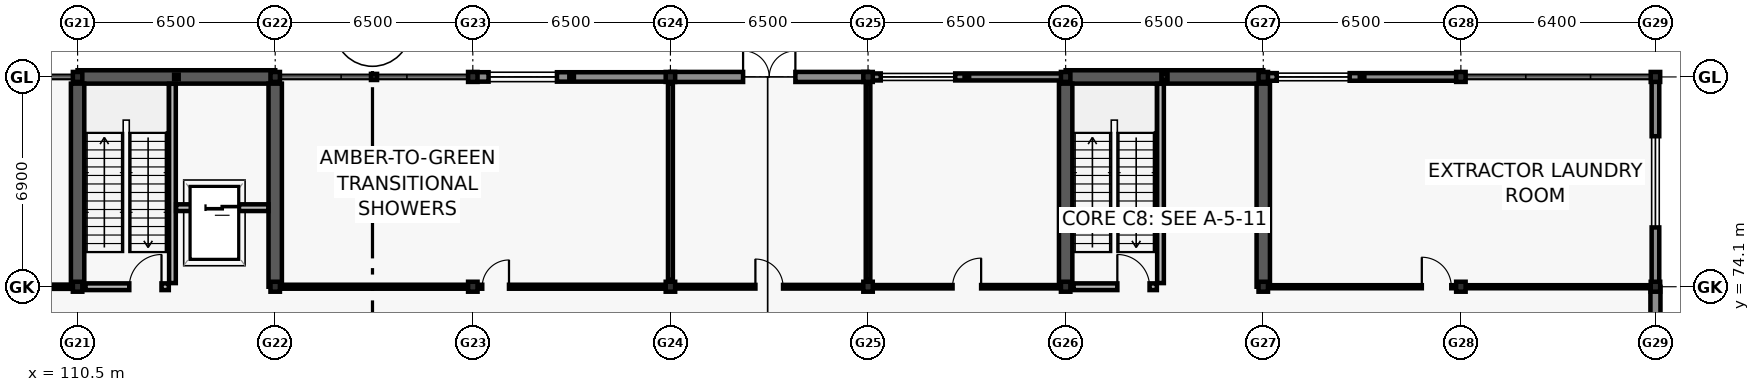
"""IFC4 building model, lengths in metres.
Left out: names, types, materials, properties, quantities, classifications, styles, units other than length and angle.
Written with IfcOpenShell. Run it as: python <this file> out.ifc"""

import sys

from ifc_helpers import new_model, si_unit, direction, frame, frame_2d, origin, origin_2d, place, context, subcontext, project, spatial, rectangle, hollow_rectangle, i_section, extrude, element, fill, save


model = new_model("IFC4")
c1 = context("Model", 3, precision=1e-05, world=origin(), true_north=direction((0.0, 1.0)))
c2 = subcontext(c1, "Body", "Model", "MODEL_VIEW")
j1 = project(units=[si_unit("LENGTHUNIT", "METRE"), si_unit("PLANEANGLEUNIT", "RADIAN")], contexts=[c1])
p1 = place(None, origin())
s1 = spatial("IfcSite", under=j1, at=p1, CompositionType="ELEMENT")
p2 = place(p1, origin())
s2 = spatial("IfcBuilding", under=s1, at=p2, CompositionType="ELEMENT")
p3 = place(p2, origin())
s3 = spatial("IfcBuildingStorey", under=s2, at=p3, CompositionType="ELEMENT", Elevation=0.0)
for number, where, z_axis, x_axis in (
    (1, (110.5, 74.1, 0.0), (0.0, 0.0, 1.0), (1.0, 0.0, 0.0)),
    (2, (110.5, 81.0, 0.0), (0.0, 0.0, 1.0), (1.0, 0.0, 0.0)),
    (3, (117.0, 74.1, 0.0), (0.0, 0.0, 1.0), (1.0, 0.0, 0.0)),
    (4, (117.0, 81.0, 0.0), (0.0, 0.0, 1.0), (1.0, 0.0, 0.0)),
    (5, (123.5, 74.1, 0.0), (0.0, 0.0, 1.0), (1.0, 0.0, 0.0)),
    (6, (123.5, 81.0, 0.0), (0.0, 0.0, 1.0), (1.0, 0.0, 0.0)),
    (7, (130.0, 74.1, 0.0), (0.0, 0.0, 1.0), (1.0, 0.0, 0.0)),
    (8, (130.0, 81.0, 0.0), (0.0, 0.0, 1.0), (1.0, 0.0, 0.0)),
    (9, (136.5, 74.1, 0.0), (0.0, 0.0, 1.0), (1.0, 0.0, 0.0)),
    (10, (136.5, 81.0, 0.0), (0.0, 0.0, 1.0), (1.0, 0.0, 0.0)),
    (11, (143.0, 74.1, 0.0), (0.0, 0.0, 1.0), (1.0, 0.0, 0.0)),
    (12, (143.0, 81.0, 0.0), (0.0, 0.0, 1.0), (1.0, 0.0, 0.0)),
    (13, (149.5, 74.1, 0.0), (0.0, 0.0, 1.0), (1.0, 0.0, 0.0)),
    (14, (149.5, 81.0, 0.0), (0.0, 0.0, 1.0), (1.0, 0.0, 0.0)),
    (15, (156.0, 74.1, 0.0), (0.0, 0.0, 1.0), (1.0, 0.0, 0.0)),
    (16, (156.0, 81.0, 0.0), (0.0, 0.0, 1.0), (1.0, 0.0, 0.0)),
    (17, (162.4, 74.1, 0.0), (0.0, 0.0, 1.0), (1.0, 0.0, 0.0)),
    (18, (162.4, 81.0, 0.0), (0.0, 0.0, 1.0), (1.0, 0.0, 0.0)),
):
    element("IfcColumn", number, at=place(p3, frame(where, z_axis=z_axis, x_axis=x_axis)), inside=s3, PredefinedType="COLUMN", context=c2, shape_type="SweptSolid", body=[
        extrude(i_section(OverallWidth=0.311, OverallDepth=0.327, WebThickness=0.016, FlangeThickness=0.025, FilletRadius=0.017, at=origin_2d()), origin(), (0.0, 0.0, 1.0), 5.4),
    ])
p4 = place(p3, frame((113.75, 81.0, 0.0), z_axis=(0.0, 0.0, 1.0), x_axis=(1.0, 0.0, 0.0)))
e19 = element("IfcColumn", 19, at=p4, inside=s3, PredefinedType="PILASTER", context=c2, shape_type="SweptSolid", body=[
    extrude(hollow_rectangle(XDim=0.15, YDim=0.15, WallThickness=0.009, at=origin_2d()), origin(), (0.0, 0.0, 1.0), 5.4),
])
p5 = place(p3, frame((120.25, 81.0, 0.0), z_axis=(0.0, 0.0, 1.0), x_axis=(1.0, 0.0, 0.0)))
e20 = element("IfcColumn", 20, at=p5, inside=s3, PredefinedType="PILASTER", context=c2, shape_type="SweptSolid", body=[
    extrude(hollow_rectangle(XDim=0.2, YDim=0.2, WallThickness=0.01, at=origin_2d()), origin(), (0.0, 0.0, 1.0), 5.4),
])
for number, where, z_axis, x_axis in (
    (21, (126.75, 81.0, 0.0), (0.0, 0.0, 1.0), (1.0, 0.0, 0.0)),
    (22, (139.75, 81.0, 0.0), (0.0, 0.0, 1.0), (1.0, 0.0, 0.0)),
):
    element("IfcColumn", number, at=place(p3, frame(where, z_axis=z_axis, x_axis=x_axis)), inside=s3, PredefinedType="PILASTER", context=c2, shape_type="SweptSolid", body=[
        extrude(hollow_rectangle(XDim=0.15, YDim=0.15, WallThickness=0.009, at=origin_2d()), origin(), (0.0, 0.0, 1.0), 5.4),
    ])
p6 = place(p3, frame((146.25, 81.0, 0.0), z_axis=(0.0, 0.0, 1.0), x_axis=(1.0, 0.0, 0.0)))
e23 = element("IfcColumn", 23, at=p6, inside=s3, PredefinedType="PILASTER", context=c2, shape_type="SweptSolid", body=[
    extrude(hollow_rectangle(XDim=0.2, YDim=0.2, WallThickness=0.01, at=origin_2d()), origin(), (0.0, 0.0, 1.0), 5.4),
])
p7 = place(p3, frame((152.75, 81.0, 0.0), z_axis=(0.0, 0.0, 1.0), x_axis=(1.0, 0.0, 0.0)))
e24 = element("IfcColumn", 24, at=p7, inside=s3, PredefinedType="PILASTER", context=c2, shape_type="SweptSolid", body=[
    extrude(hollow_rectangle(XDim=0.15, YDim=0.15, WallThickness=0.009, at=origin_2d()), origin(), (0.0, 0.0, 1.0), 5.4),
])
p8 = place(p3, frame((110.5, 81.0, 0.0), z_axis=(0.0, 0.0, 1.0), x_axis=(1.0, 0.0, 0.0)))
e25 = element("IfcWall", 25, at=p8, inside=s3, PredefinedType="SHEAR", context=c2, shape_type="SweptSolid", body=[
    extrude(rectangle(XDim=6.5, YDim=0.44, at=frame_2d((3.25, 0.0))), origin(), (0.0, 0.0, 1.0), 5.16),
])
for number, where, z_axis, x_axis in (
    (26, (110.5, 74.1, 0.0), (0.0, 0.0, 1.0), (0.0, 1.0, 0.0)),
    (27, (117.0, 74.1, 0.0), (0.0, 0.0, 1.0), (0.0, 1.0, 0.0)),
):
    element("IfcWall", number, at=place(p3, frame(where, z_axis=z_axis, x_axis=x_axis)), inside=s3, PredefinedType="SHEAR", context=c2, shape_type="SweptSolid", body=[
        extrude(rectangle(XDim=6.68, YDim=0.44, at=frame_2d((3.34, 0.0))), origin(), (0.0, 0.0, 1.0), 5.16),
    ])
p9 = place(p3, frame((143.0, 81.0, 0.0), z_axis=(0.0, 0.0, 1.0), x_axis=(1.0, 0.0, 0.0)))
e28 = element("IfcWall", 28, at=p9, inside=s3, PredefinedType="SHEAR", context=c2, shape_type="SweptSolid", body=[
    extrude(rectangle(XDim=6.5, YDim=0.44, at=frame_2d((3.25, 0.0))), origin(), (0.0, 0.0, 1.0), 5.16),
])
for number, where, z_axis, x_axis in (
    (29, (143.0, 74.1, 0.0), (0.0, 0.0, 1.0), (0.0, 1.0, 0.0)),
    (30, (149.5, 74.1, 0.0), (0.0, 0.0, 1.0), (0.0, 1.0, 0.0)),
):
    element("IfcWall", number, at=place(p3, frame(where, z_axis=z_axis, x_axis=x_axis)), inside=s3, PredefinedType="SHEAR", context=c2, shape_type="SweptSolid", body=[
        extrude(rectangle(XDim=6.68, YDim=0.44, at=frame_2d((3.34, 0.0))), origin(), (0.0, 0.0, 1.0), 5.16),
    ])
p10 = place(p3, frame((123.505, 81.0, 0.0), z_axis=(0.0, 0.0, 1.0), x_axis=(1.0, 0.0, 0.0)))
e31 = element("IfcWall", 31, at=p10, inside=s3, PredefinedType="SOLIDWALL", context=c2, shape_type="SweptSolid", body=[
    extrude(rectangle(XDim=6.49, YDim=0.31, at=frame_2d((3.245, 0.0))), origin(), (0.0, 0.0, 1.0), 4.52),
])
p11 = place(p10, frame((0.512, 0.0, 0.8)))
e32 = element("IfcOpeningElement", 32, at=p11, cuts=e31, PredefinedType="OPENING", context=c2, shape_type="SweptSolid", body=[
    extrude(rectangle(XDim=2.25, YDim=1.95, at=frame_2d((1.125, 0.975))), frame((0.0, 0.165, 0.0), z_axis=(0.0, -1.0, 0.0), x_axis=(1.0, 0.0, 0.0)), (0.0, 0.0, 1.0), 0.33),
])
p12 = place(p3, frame((130.005, 81.0, 0.0), z_axis=(0.0, 0.0, 1.0), x_axis=(1.0, 0.0, 0.0)))
e33 = element("IfcWall", 33, at=p12, inside=s3, PredefinedType="SOLIDWALL", context=c2, shape_type="SweptSolid", body=[
    extrude(rectangle(XDim=6.49, YDim=0.33, at=frame_2d((3.245, 0.0))), origin(), (0.0, 0.0, 1.0), 4.52),
])
p13 = place(p12, frame((2.385, 0.0, 0.0)))
e34 = element("IfcOpeningElement", 34, at=p13, cuts=e33, PredefinedType="OPENING", context=c2, shape_type="SweptSolid", body=[
    extrude(rectangle(XDim=1.72, YDim=2.2, at=frame_2d((0.86, 1.1))), frame((0.0, 0.175, 0.0), z_axis=(0.0, -1.0, 0.0), x_axis=(1.0, 0.0, 0.0)), (0.0, 0.0, 1.0), 0.35),
])
p14 = place(p3, frame((136.505, 81.0, 0.0), z_axis=(0.0, 0.0, 1.0), x_axis=(1.0, 0.0, 0.0)))
e35 = element("IfcWall", 35, at=p14, inside=s3, PredefinedType="SOLIDWALL", context=c2, shape_type="SweptSolid", body=[
    extrude(rectangle(XDim=6.49, YDim=0.23, at=frame_2d((3.245, 0.0))), origin(), (0.0, 0.0, 1.0), 4.52),
])
p15 = place(p14, frame((0.413, 0.0, 0.8)))
e36 = element("IfcOpeningElement", 36, at=p15, cuts=e35, PredefinedType="OPENING", context=c2, shape_type="SweptSolid", body=[
    extrude(rectangle(XDim=2.45, YDim=1.95, at=frame_2d((1.225, 0.975))), frame((0.0, 0.125, 0.0), z_axis=(0.0, -1.0, 0.0), x_axis=(1.0, 0.0, 0.0)), (0.0, 0.0, 1.0), 0.25),
])
p16 = place(p3, frame((149.505, 81.0, 0.0), z_axis=(0.0, 0.0, 1.0), x_axis=(1.0, 0.0, 0.0)))
e37 = element("IfcWall", 37, at=p16, inside=s3, PredefinedType="SOLIDWALL", context=c2, shape_type="SweptSolid", body=[
    extrude(rectangle(XDim=6.49, YDim=0.25, at=frame_2d((3.245, 0.0))), origin(), (0.0, 0.0, 1.0), 4.52),
])
p17 = place(p16, frame((0.438, 0.0, 0.8)))
e38 = element("IfcOpeningElement", 38, at=p17, cuts=e37, PredefinedType="OPENING", context=c2, shape_type="SweptSolid", body=[
    extrude(rectangle(XDim=2.4, YDim=2.1, at=frame_2d((1.2, 1.05))), frame((0.0, 0.135, 0.0), z_axis=(0.0, -1.0, 0.0), x_axis=(1.0, 0.0, 0.0)), (0.0, 0.0, 1.0), 0.27),
])
p18 = place(p3, frame((162.4, 74.095, 0.0), z_axis=(0.0, 0.0, 1.0), x_axis=(0.0, -1.0, 0.0)))
e39 = element("IfcWall", 39, at=p18, inside=s3, PredefinedType="SOLIDWALL", context=c2, shape_type="SweptSolid", body=[
    extrude(rectangle(XDim=6.89, YDim=0.33, at=frame_2d((3.445, 0.0))), origin(), (0.0, 0.0, 1.0), 4.52),
])
p19 = place(p18, frame((3.377, 0.0, 0.8)))
e40 = element("IfcOpeningElement", 40, at=p19, cuts=e39, PredefinedType="OPENING", context=c2, shape_type="SweptSolid", body=[
    extrude(rectangle(XDim=2.7, YDim=2.1, at=frame_2d((1.35, 1.05))), frame((0.0, 0.175, 0.0), z_axis=(0.0, -1.0, 0.0), x_axis=(1.0, 0.0, 0.0)), (0.0, 0.0, 1.0), 0.35),
])
p20 = place(p3, frame((162.4, 80.995, 0.0), z_axis=(0.0, 0.0, 1.0), x_axis=(0.0, -1.0, 0.0)))
e41 = element("IfcWall", 41, at=p20, inside=s3, PredefinedType="SOLIDWALL", context=c2, shape_type="SweptSolid", body=[
    extrude(rectangle(XDim=6.89, YDim=0.25, at=frame_2d((3.445, 0.0))), origin(), (0.0, 0.0, 1.0), 4.52),
])
p21 = place(p20, frame((1.945, 0.0, 0.8)))
e42 = element("IfcOpeningElement", 42, at=p21, cuts=e41, PredefinedType="OPENING", context=c2, shape_type="SweptSolid", body=[
    extrude(rectangle(XDim=3.0, YDim=2.1, at=frame_2d((1.5, 1.05))), frame((0.0, 0.135, 0.0), z_axis=(0.0, -1.0, 0.0), x_axis=(1.0, 0.0, 0.0)), (0.0, 0.0, 1.0), 0.27),
])
p22 = place(p3, frame((113.62, 74.22, 0.0), z_axis=(0.0, 0.0, 1.0), x_axis=(0.0, 1.0, 0.0)))
e43 = element("IfcWall", 43, at=p22, inside=s3, PredefinedType="SOLIDWALL", context=c2, shape_type="SweptSolid", body=[
    extrude(rectangle(XDim=6.555, YDim=0.22, at=frame_2d((3.277, 0.0))), origin(), (0.0, 0.0, 1.0), 5.16),
])
p23 = place(p3, frame((110.76, 74.1, 0.0), z_axis=(0.0, 0.0, 1.0), x_axis=(1.0, 0.0, 0.0)))
e44 = element("IfcWall", 44, at=p23, inside=s3, PredefinedType="SOLIDWALL", context=c2, shape_type="SweptSolid", body=[
    extrude(rectangle(XDim=2.74, YDim=0.22, at=frame_2d((1.37, 0.0))), origin(), (0.0, 0.0, 1.0), 4.52),
])
p24 = place(p23, frame((1.44, 0.0, 0.0)))
e45 = element("IfcOpeningElement", 45, at=p24, cuts=e44, PredefinedType="OPENING", context=c2, shape_type="SweptSolid", body=[
    extrude(rectangle(XDim=1.06, YDim=2.1, at=frame_2d((0.53, 1.05))), frame((0.0, 0.12, 0.0), z_axis=(0.0, -1.0, 0.0), x_axis=(1.0, 0.0, 0.0)), (0.0, 0.0, 1.0), 0.24),
])
p25 = place(p3, frame((113.74, 76.7, 0.0), z_axis=(0.0, 0.0, 1.0), x_axis=(1.0, 0.0, 0.0)))
e46 = element("IfcWall", 46, at=p25, inside=s3, PredefinedType="SOLIDWALL", context=c2, shape_type="SweptSolid", body=[
    extrude(rectangle(XDim=3.035, YDim=0.22, at=frame_2d((1.518, 0.0))), origin(), (0.0, 0.0, 1.0), 5.16),
])
p26 = place(p25, frame((0.968, 0.0, 0.0)))
e47 = element("IfcOpeningElement", 47, at=p26, cuts=e46, PredefinedType="OPENING", context=c2, shape_type="SweptSolid", body=[
    extrude(rectangle(XDim=1.1, YDim=2.1, at=frame_2d((0.55, 1.05))), frame((0.0, 0.12, 0.0), z_axis=(0.0, -1.0, 0.0), x_axis=(1.0, 0.0, 0.0)), (0.0, 0.0, 1.0), 0.24),
])
p27 = place(p3, frame((146.12, 74.22, 0.0), z_axis=(0.0, 0.0, 1.0), x_axis=(0.0, 1.0, 0.0)))
e48 = element("IfcWall", 48, at=p27, inside=s3, PredefinedType="SOLIDWALL", context=c2, shape_type="SweptSolid", body=[
    extrude(rectangle(XDim=6.555, YDim=0.22, at=frame_2d((3.277, 0.0))), origin(), (0.0, 0.0, 1.0), 5.16),
])
p28 = place(p3, frame((143.26, 74.1, 0.0), z_axis=(0.0, 0.0, 1.0), x_axis=(1.0, 0.0, 0.0)))
e49 = element("IfcWall", 49, at=p28, inside=s3, PredefinedType="SOLIDWALL", context=c2, shape_type="SweptSolid", body=[
    extrude(rectangle(XDim=2.74, YDim=0.22, at=frame_2d((1.37, 0.0))), origin(), (0.0, 0.0, 1.0), 4.52),
])
p29 = place(p28, frame((1.44, 0.0, 0.0)))
e50 = element("IfcOpeningElement", 50, at=p29, cuts=e49, PredefinedType="OPENING", context=c2, shape_type="SweptSolid", body=[
    extrude(rectangle(XDim=1.06, YDim=2.1, at=frame_2d((0.53, 1.05))), frame((0.0, 0.12, 0.0), z_axis=(0.0, -1.0, 0.0), x_axis=(1.0, 0.0, 0.0)), (0.0, 0.0, 1.0), 0.24),
])
p30 = place(p3, frame((104.22, 74.1, 0.0), z_axis=(0.0, 0.0, 1.0), x_axis=(1.0, 0.0, 0.0)))
e51 = element("IfcWall", 51, at=p30, inside=s3, PredefinedType="PARTITIONING", context=c2, shape_type="SweptSolid", body=[
    extrude(rectangle(XDim=6.06, YDim=0.14, at=frame_2d((3.03, 0.0))), origin(), (0.0, 0.0, 1.0), 4.5),
])
p31 = place(p30, frame((2.11, 0.0, 0.0)))
e52 = element("IfcOpeningElement", 52, at=p31, cuts=e51, PredefinedType="OPENING", context=c2, shape_type="SweptSolid", body=[
    extrude(rectangle(XDim=1.84, YDim=2.22, at=frame_2d((0.92, 1.11))), frame((0.0, 0.08, 0.0), z_axis=(0.0, -1.0, 0.0), x_axis=(1.0, 0.0, 0.0)), (0.0, 0.0, 1.0), 0.16),
])
p32 = place(p3, frame((117.22, 74.1, 0.0), z_axis=(0.0, 0.0, 1.0), x_axis=(1.0, 0.0, 0.0)))
e53 = element("IfcWall", 53, at=p32, inside=s3, PredefinedType="PARTITIONING", context=c2, shape_type="SweptSolid", body=[
    extrude(rectangle(XDim=12.56, YDim=0.13, at=frame_2d((6.28, 0.0))), origin(), (0.0, 0.0, 1.0), 4.5),
])
p33 = place(p32, frame((6.59, 0.0, 0.0)))
e54 = element("IfcOpeningElement", 54, at=p33, cuts=e53, PredefinedType="OPENING", context=c2, shape_type="SweptSolid", body=[
    extrude(rectangle(XDim=0.88, YDim=2.04, at=frame_2d((0.44, 1.02))), frame((0.0, 0.075, 0.0), z_axis=(0.0, -1.0, 0.0), x_axis=(1.0, 0.0, 0.0)), (0.0, 0.0, 1.0), 0.15),
])
p34 = place(p3, frame((130.22, 74.1, 0.0), z_axis=(0.0, 0.0, 1.0), x_axis=(1.0, 0.0, 0.0)))
e55 = element("IfcWall", 55, at=p34, inside=s3, PredefinedType="PARTITIONING", context=c2, shape_type="SweptSolid", body=[
    extrude(rectangle(XDim=6.06, YDim=0.12, at=frame_2d((3.03, 0.0))), origin(), (0.0, 0.0, 1.0), 4.5),
])
p35 = place(p34, frame((2.575, 0.0, 0.0)))
e56 = element("IfcOpeningElement", 56, at=p35, cuts=e55, PredefinedType="OPENING", context=c2, shape_type="SweptSolid", body=[
    extrude(rectangle(XDim=0.91, YDim=2.06, at=frame_2d((0.455, 1.03))), frame((0.0, 0.07, 0.0), z_axis=(0.0, -1.0, 0.0), x_axis=(1.0, 0.0, 0.0)), (0.0, 0.0, 1.0), 0.14),
])
p36 = place(p3, frame((136.72, 74.1, 0.0), z_axis=(0.0, 0.0, 1.0), x_axis=(1.0, 0.0, 0.0)))
e57 = element("IfcWall", 57, at=p36, inside=s3, PredefinedType="PARTITIONING", context=c2, shape_type="SweptSolid", body=[
    extrude(rectangle(XDim=6.06, YDim=0.11, at=frame_2d((3.03, 0.0))), origin(), (0.0, 0.0, 1.0), 4.5),
])
p37 = place(p36, frame((2.56, 0.0, 0.0)))
e58 = element("IfcOpeningElement", 58, at=p37, cuts=e57, PredefinedType="OPENING", context=c2, shape_type="SweptSolid", body=[
    extrude(rectangle(XDim=0.94, YDim=2.08, at=frame_2d((0.47, 1.04))), frame((0.0, 0.065, 0.0), z_axis=(0.0, -1.0, 0.0), x_axis=(1.0, 0.0, 0.0)), (0.0, 0.0, 1.0), 0.13),
])
p38 = place(p3, frame((149.72, 74.1, 0.0), z_axis=(0.0, 0.0, 1.0), x_axis=(1.0, 0.0, 0.0)))
e59 = element("IfcWall", 59, at=p38, inside=s3, PredefinedType="PARTITIONING", context=c2, shape_type="SweptSolid", body=[
    extrude(rectangle(XDim=12.46, YDim=0.1, at=frame_2d((6.23, 0.0))), origin(), (0.0, 0.0, 1.0), 4.5),
])
p39 = place(p38, frame((4.995, 0.0, 0.0)))
e60 = element("IfcOpeningElement", 60, at=p39, cuts=e59, PredefinedType="OPENING", context=c2, shape_type="SweptSolid", body=[
    extrude(rectangle(XDim=0.97, YDim=2.1, at=frame_2d((0.485, 1.05))), frame((0.0, 0.06, 0.0), z_axis=(0.0, -1.0, 0.0), x_axis=(1.0, 0.0, 0.0)), (0.0, 0.0, 1.0), 0.12),
])
p40 = place(p3, frame((130.0, 74.32, 0.0), z_axis=(0.0, 0.0, 1.0), x_axis=(0.0, 1.0, 0.0)))
e61 = element("IfcWall", 61, at=p40, inside=s3, PredefinedType="PARTITIONING", context=c2, shape_type="SweptSolid", body=[
    extrude(rectangle(XDim=6.46, YDim=0.16, at=frame_2d((3.23, 0.0))), origin(), (0.0, 0.0, 1.0), 4.5),
])
p41 = place(p3, frame((136.5, 74.32, 0.0), z_axis=(0.0, 0.0, 1.0), x_axis=(0.0, 1.0, 0.0)))
e62 = element("IfcWall", 62, at=p41, inside=s3, PredefinedType="PARTITIONING", context=c2, shape_type="SweptSolid", body=[
    extrude(rectangle(XDim=6.46, YDim=0.15, at=frame_2d((3.23, 0.0))), origin(), (0.0, 0.0, 1.0), 4.5),
])
p42 = place(p11, origin())
e63 = element("IfcWindow", 63, at=p42, inside=s3, PartitioningType="DOUBLE_PANEL_VERTICAL", PredefinedType="WINDOW", context=c2, shape_type="SweptSolid", body=[
    extrude(rectangle(XDim=2.25, YDim=1.95, at=frame_2d((1.125, 0.975))), frame((0.0, 0.03, 0.0), z_axis=(0.0, -1.0, 0.0), x_axis=(1.0, 0.0, 0.0)), (0.0, 0.0, 1.0), 0.06),
])
fill(e32, e63)
p43 = place(p13, origin())
e64 = element("IfcDoor", 64, at=p43, inside=s3, OperationType="DOUBLE_DOOR_SINGLE_SWING", PredefinedType="DOOR", context=c2, shape_type="SweptSolid", body=[
    extrude(rectangle(XDim=1.72, YDim=2.2, at=frame_2d((0.86, 1.1))), frame((0.0, 0.025, 0.0), z_axis=(0.0, -1.0, 0.0), x_axis=(1.0, 0.0, 0.0)), (0.0, 0.0, 1.0), 0.05),
])
fill(e34, e64)
p44 = place(p15, origin())
e65 = element("IfcWindow", 65, at=p44, inside=s3, PartitioningType="TRIPLE_PANEL_VERTICAL", PredefinedType="WINDOW", context=c2, shape_type="SweptSolid", body=[
    extrude(rectangle(XDim=2.45, YDim=1.95, at=frame_2d((1.225, 0.975))), frame((0.0, 0.03, 0.0), z_axis=(0.0, -1.0, 0.0), x_axis=(1.0, 0.0, 0.0)), (0.0, 0.0, 1.0), 0.06),
])
fill(e36, e65)
p45 = place(p17, origin())
e66 = element("IfcWindow", 66, at=p45, inside=s3, PartitioningType="TRIPLE_PANEL_VERTICAL", PredefinedType="WINDOW", context=c2, shape_type="SweptSolid", body=[
    extrude(rectangle(XDim=2.4, YDim=2.1, at=frame_2d((1.2, 1.05))), frame((0.0, 0.03, 0.0), z_axis=(0.0, -1.0, 0.0), x_axis=(1.0, 0.0, 0.0)), (0.0, 0.0, 1.0), 0.06),
])
fill(e38, e66)
p46 = place(p21, origin())
e67 = element("IfcWindow", 67, at=p46, inside=s3, PartitioningType="TRIPLE_PANEL_VERTICAL", PredefinedType="WINDOW", context=c2, shape_type="SweptSolid", body=[
    extrude(rectangle(XDim=3.0, YDim=2.1, at=frame_2d((1.5, 1.05))), frame((0.0, 0.03, 0.0), z_axis=(0.0, -1.0, 0.0), x_axis=(1.0, 0.0, 0.0)), (0.0, 0.0, 1.0), 0.06),
])
fill(e42, e67)
p47 = place(p24, origin())
e68 = element("IfcDoor", 68, at=p47, inside=s3, OperationType="SINGLE_SWING_RIGHT", PredefinedType="DOOR", context=c2, shape_type="SweptSolid", body=[
    extrude(rectangle(XDim=1.06, YDim=2.1, at=frame_2d((0.53, 1.05))), frame((0.0, 0.025, 0.0), z_axis=(0.0, -1.0, 0.0), x_axis=(1.0, 0.0, 0.0)), (0.0, 0.0, 1.0), 0.05),
])
fill(e45, e68)
p48 = place(p26, origin())
e69 = element("IfcDoor", 69, at=p48, inside=s3, OperationType="DOUBLE_DOOR_SLIDING", PredefinedType="DOOR", context=c2, shape_type="SweptSolid", body=[
    extrude(rectangle(XDim=1.1, YDim=2.1, at=frame_2d((0.55, 1.05))), frame((0.0, 0.025, 0.0), z_axis=(0.0, -1.0, 0.0), x_axis=(1.0, 0.0, 0.0)), (0.0, 0.0, 1.0), 0.05),
])
fill(e47, e69)
p49 = place(p29, origin())
e70 = element("IfcDoor", 70, at=p49, inside=s3, OperationType="SINGLE_SWING_LEFT", PredefinedType="DOOR", context=c2, shape_type="SweptSolid", body=[
    extrude(rectangle(XDim=1.06, YDim=2.1, at=frame_2d((0.53, 1.05))), frame((0.0, 0.025, 0.0), z_axis=(0.0, -1.0, 0.0), x_axis=(1.0, 0.0, 0.0)), (0.0, 0.0, 1.0), 0.05),
])
fill(e50, e70)
p50 = place(p33, origin())
e71 = element("IfcDoor", 71, at=p50, inside=s3, OperationType="SINGLE_SWING_RIGHT", PredefinedType="DOOR", context=c2, shape_type="SweptSolid", body=[
    extrude(rectangle(XDim=0.88, YDim=2.04, at=frame_2d((0.44, 1.02))), frame((0.0, 0.025, 0.0), z_axis=(0.0, -1.0, 0.0), x_axis=(1.0, 0.0, 0.0)), (0.0, 0.0, 1.0), 0.05),
])
fill(e54, e71)
p51 = place(p35, origin())
e72 = element("IfcDoor", 72, at=p51, inside=s3, OperationType="SINGLE_SWING_LEFT", PredefinedType="DOOR", context=c2, shape_type="SweptSolid", body=[
    extrude(rectangle(XDim=0.91, YDim=2.06, at=frame_2d((0.455, 1.03))), frame((0.0, 0.025, 0.0), z_axis=(0.0, -1.0, 0.0), x_axis=(1.0, 0.0, 0.0)), (0.0, 0.0, 1.0), 0.05),
])
fill(e56, e72)
p52 = place(p37, origin())
e73 = element("IfcDoor", 73, at=p52, inside=s3, OperationType="SINGLE_SWING_RIGHT", PredefinedType="DOOR", context=c2, shape_type="SweptSolid", body=[
    extrude(rectangle(XDim=0.94, YDim=2.08, at=frame_2d((0.47, 1.04))), frame((0.0, 0.025, 0.0), z_axis=(0.0, -1.0, 0.0), x_axis=(1.0, 0.0, 0.0)), (0.0, 0.0, 1.0), 0.05),
])
fill(e58, e73)
p53 = place(p39, origin())
e74 = element("IfcDoor", 74, at=p53, inside=s3, OperationType="SINGLE_SWING_LEFT", PredefinedType="DOOR", context=c2, shape_type="SweptSolid", body=[
    extrude(rectangle(XDim=0.97, YDim=2.1, at=frame_2d((0.485, 1.05))), frame((0.0, 0.025, 0.0), z_axis=(0.0, -1.0, 0.0), x_axis=(1.0, 0.0, 0.0)), (0.0, 0.0, 1.0), 0.05),
])
fill(e60, e74)
save(model, sys.argv[1])
